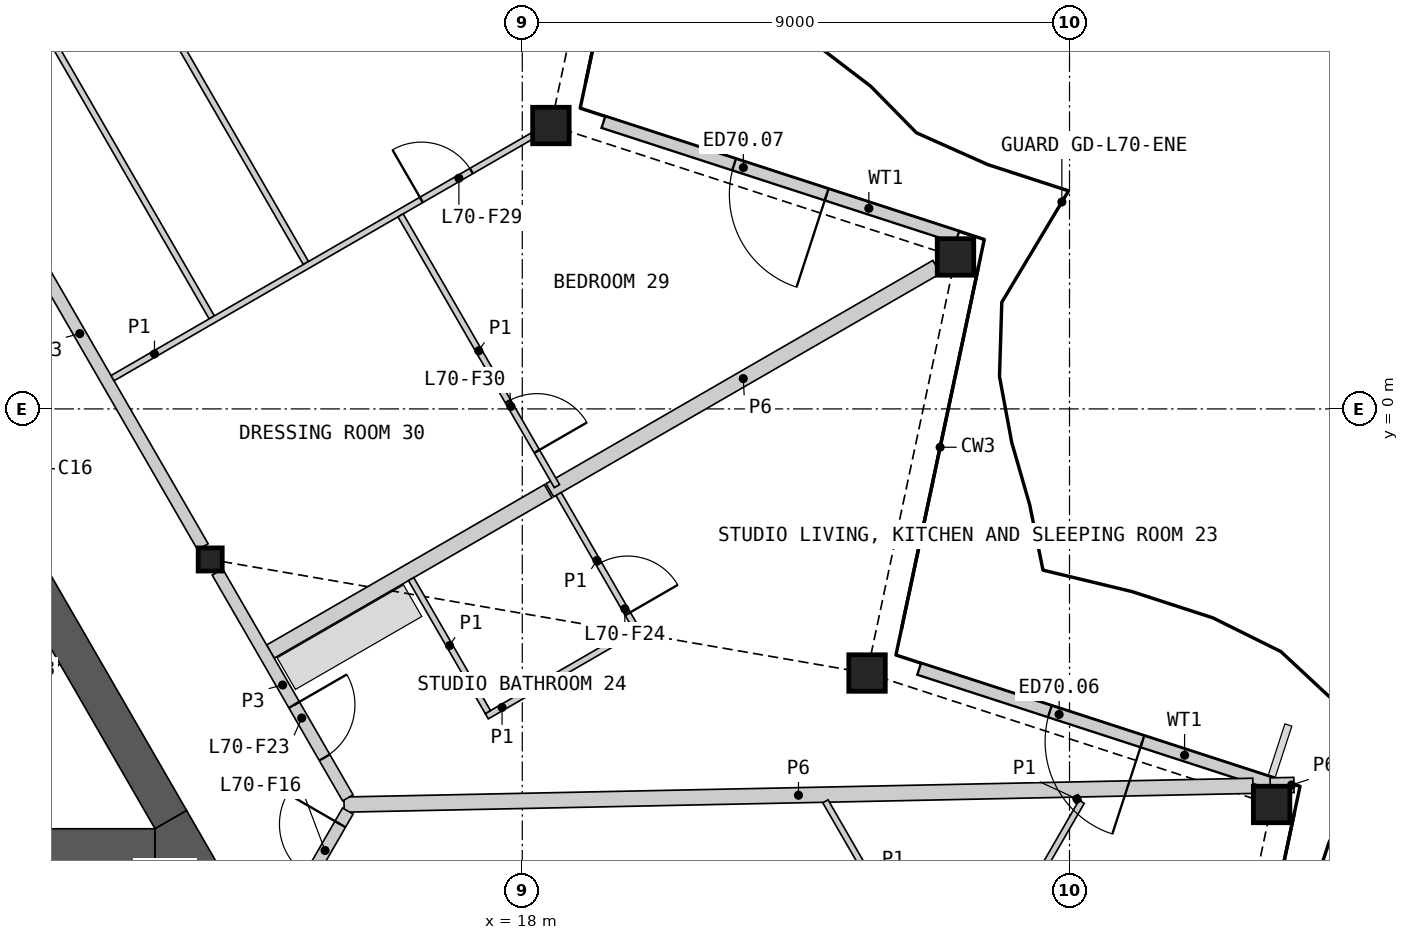
"""IFC4 building model, lengths in metres.
Left out: names, types, materials, properties, quantities, classifications, styles, units other than length and angle.
Written with IfcOpenShell. Run it as: python <this file> out.ifc"""

import sys

from ifc_helpers import new_model, si_unit, direction, frame, frame_2d, origin, origin_2d, place, context, subcontext, project, spatial, polyline, rectangle, hollow_rectangle, i_section, outline, extrude, element, fill, save


model = new_model("IFC4")
c1 = context("Model", 3, precision=1e-05, world=origin(), true_north=direction((0.0, 1.0)))
c2 = subcontext(c1, "Body", "Model", "MODEL_VIEW")
j1 = project(units=[si_unit("LENGTHUNIT", "METRE"), si_unit("PLANEANGLEUNIT", "RADIAN")], contexts=[c1])
p1 = place(None, origin())
s1 = spatial("IfcSite", under=j1, at=p1, CompositionType="ELEMENT")
p2 = place(p1, origin())
s2 = spatial("IfcBuilding", under=s1, at=p2, CompositionType="ELEMENT")
p3 = place(p2, frame((0.0, 0.0, 318.8)))
s3 = spatial("IfcBuildingStorey", under=s2, at=p3, CompositionType="ELEMENT", Elevation=318.8)
for number, where, z_axis, x_axis in (
    (1, (30.324, -6.506, 0.0), (0.0, 0.0, 1.0), (1.0, 0.0, 0.0)),
    (2, (23.67, -4.344, 0.0), (0.0, 0.0, 1.0), (1.0, 0.0, 0.0)),
    (3, (25.125, 2.499, 0.0), (0.0, 0.0, 1.0), (1.0, 0.0, 0.0)),
    (4, (18.471, 4.661, 0.0), (0.0, 0.0, 1.0), (1.0, 0.0, 0.0)),
):
    element("IfcColumn", number, at=place(p3, frame(where, z_axis=z_axis, x_axis=x_axis)), inside=s3, PredefinedType="COLUMN", context=c2, shape_type="SweptSolid", body=[
        extrude(hollow_rectangle(XDim=0.6, YDim=0.6, WallThickness=0.04, at=origin_2d()), origin(), (0.0, 0.0, 1.0), 3.4),
    ])
p4 = place(p3, frame((12.868, -2.476, 0.0), z_axis=(0.0, 0.0, 1.0), x_axis=(1.0, 0.0, 0.0)))
e5 = element("IfcColumn", 5, at=p4, inside=s3, PredefinedType="COLUMN", context=c2, shape_type="SweptSolid", body=[
    extrude(i_section(OverallWidth=0.396, OverallDepth=0.381, WebThickness=0.019, FlangeThickness=0.03, at=origin_2d()), origin(), (0.0, 0.0, 1.0), 3.4),
])
p5 = place(p3, frame((30.347, -6.168, 0.0), z_axis=(0.0, 0.0, 1.0), x_axis=(-0.951053709789, 0.309025631781, 0.0)))
e6 = element("IfcWall", 6, at=p5, inside=s3, PredefinedType="SOLIDWALL", context=c2, shape_type="SweptSolid", body=[
    extrude(rectangle(XDim=6.12, YDim=0.2, at=frame_2d((3.06, 0.0))), origin(), (0.0, 0.0, 1.0), 2.488),
])
p6 = place(p5, frame((2.26, 0.0, 0.0)))
e7 = element("IfcOpeningElement", 7, at=p6, cuts=e6, PredefinedType="OPENING", context=c2, shape_type="SweptSolid", body=[
    extrude(rectangle(XDim=1.6, YDim=2.25, at=frame_2d((0.8, 1.125))), frame((0.0, 0.11, 0.0), z_axis=(0.0, -1.0, 0.0), x_axis=(1.0, 0.0, 0.0)), (0.0, 0.0, 1.0), 0.22),
])
p7 = place(p3, frame((25.155, 2.826, 0.0), z_axis=(0.0, 0.0, 1.0), x_axis=(-0.951053709789, 0.309025631781, 0.0)))
e8 = element("IfcWall", 8, at=p7, inside=s3, PredefinedType="SOLIDWALL", context=c2, shape_type="SweptSolid", body=[
    extrude(rectangle(XDim=6.12, YDim=0.2, at=frame_2d((3.06, 0.0))), origin(), (0.0, 0.0, 1.0), 2.488),
])
p8 = place(p7, frame((2.26, 0.0, 0.0)))
e9 = element("IfcOpeningElement", 9, at=p8, cuts=e8, PredefinedType="OPENING", context=c2, shape_type="SweptSolid", body=[
    extrude(rectangle(XDim=1.6, YDim=2.25, at=frame_2d((0.8, 1.125))), frame((0.0, 0.11, 0.0), z_axis=(0.0, -1.0, 0.0), x_axis=(1.0, 0.0, 0.0)), (0.0, 0.0, 1.0), 0.22),
])
p9 = place(p3, origin())
e10 = element("IfcWall", 10, at=p9, inside=s3, PredefinedType="SHEAR", context=c2, shape_type="SweptSolid", body=[
    extrude(outline(polyline([(8.83, -6.881), (10.374, -4.206), (10.032, -4.298), (8.738, -6.539), (8.83, -6.881)])), origin(), (0.0, 0.0, 1.0), 3.1),
])
p10 = place(p3, origin())
e11 = element("IfcWall", 11, at=p10, inside=s3, PredefinedType="SHEAR", context=c2, shape_type="SweptSolid", body=[
    extrude(outline(polyline([(10.032, -4.298), (10.374, -4.206), (5.307, -1.281), (5.182, -1.498), (10.032, -4.298)])), origin(), (0.0, 0.0, 1.0), 3.1),
])
p11 = place(p3, frame((-11.961, -7.206, 0.0), z_axis=(0.0, 0.0, 1.0), x_axis=(1.0, 0.0, 0.0)))
e12 = element("IfcWall", 12, at=p11, inside=s3, PredefinedType="SHEAR", context=c2, shape_type="SweptSolid", body=[
    extrude(rectangle(XDim=23.921, YDim=0.6, at=frame_2d((11.961, 0.0))), origin(), (0.0, 0.0, 1.0), 3.1),
])
p12 = place(p3, frame((12.221, -6.756, 0.0), z_axis=(0.0, 0.0, 1.0), x_axis=(-0.50000604952, 0.866021911064, 0.0)))
e13 = element("IfcWall", 13, at=p12, inside=s3, PredefinedType="SHEAR", context=c2, shape_type="SweptSolid", body=[
    extrude(rectangle(XDim=4.869, YDim=0.6, at=frame_2d((2.434, 0.0))), origin(), (0.0, 0.0, 1.0), 3.1),
])
p13 = place(p3, origin())
e14 = element("IfcWall", 14, at=p13, inside=s3, PredefinedType="SHEAR", context=c2, shape_type="SweptSolid", body=[
    extrude(outline(polyline([(11.961, -7.506), (11.961, -6.906), (12.48, -6.606), (13.0, -7.506), (11.961, -7.506)])), origin(), (0.0, 0.0, 1.0), 3.1),
])
p14 = place(p3, frame((15.069, -6.508, 0.0), z_axis=(0.0, 0.0, 1.0), x_axis=(0.999786619639, 0.02065708573, 0.0)))
e15 = element("IfcWall", 15, at=p14, inside=s3, PredefinedType="PARTITIONING", context=c2, shape_type="SweptSolid", body=[
    extrude(rectangle(XDim=14.951, YDim=0.25, at=frame_2d((7.475, 0.0))), origin(), (0.0, 0.0, 1.0), 2.33),
])
p15 = place(p3, frame((8.698, 4.745, 0.0), z_axis=(0.0, 0.0, 1.0), x_axis=(0.499984266882, -0.866034487114, 0.0)))
e16 = element("IfcWall", 16, at=p15, inside=s3, PredefinedType="PARTITIONING", context=c2, shape_type="SweptSolid", body=[
    extrude(rectangle(XDim=8.099, YDim=0.2, at=frame_2d((4.049, 0.0))), origin(), (0.0, 0.0, 1.0), 3.1),
])
p16 = place(p3, frame((18.454, -1.338, 0.0), z_axis=(0.0, 0.0, 1.0), x_axis=(0.866023407002, 0.500003458512, 0.0)))
e17 = element("IfcWall", 17, at=p16, inside=s3, PredefinedType="PARTITIONING", context=c2, shape_type="SweptSolid", body=[
    extrude(rectangle(XDim=7.345, YDim=0.25, at=frame_2d((3.673, 0.0))), origin(), (0.0, 0.0, 1.0), 2.33),
])
p17 = place(p3, frame((13.858, -3.991, 0.0), z_axis=(0.0, 0.0, 1.0), x_axis=(0.866032983855, 0.499986870703, 0.0)))
e18 = element("IfcWall", 18, at=p17, inside=s3, PredefinedType="PARTITIONING", context=c2, shape_type="SweptSolid", body=[
    extrude(rectangle(XDim=5.275, YDim=0.25, at=frame_2d((2.638, 0.0))), origin(), (0.0, 0.0, 1.0), 2.33),
])
p18 = place(p3, frame((12.988, -2.684, 0.0), z_axis=(0.0, 0.0, 1.0), x_axis=(0.500003406062, -0.866023437285, 0.0)))
e19 = element("IfcWall", 19, at=p18, inside=s3, PredefinedType="PARTITIONING", context=c2, shape_type="SweptSolid", body=[
    extrude(rectangle(XDim=4.288, YDim=0.2, at=frame_2d((2.144, 0.0))), origin(), (0.0, 0.0, 1.0), 3.1),
])
p19 = place(p18, frame((2.521, 0.0, 0.0)))
e20 = element("IfcOpeningElement", 20, at=p19, cuts=e19, PredefinedType="OPENING", context=c2, shape_type="SweptSolid", body=[
    extrude(rectangle(XDim=1.0, YDim=2.1, at=frame_2d((0.5, 1.05))), frame((0.0, 0.11, 0.0), z_axis=(0.0, -1.0, 0.0), x_axis=(1.0, 0.0, 0.0)), (0.0, 0.0, 1.0), 0.22),
])
p20 = place(p3, frame((13.293, -9.797, 0.0), z_axis=(0.0, 0.0, 1.0), x_axis=(0.499967746641, 0.866044024469, 0.0)))
e21 = element("IfcWall", 21, at=p20, inside=s3, PredefinedType="PARTITIONING", context=c2, shape_type="SweptSolid", body=[
    extrude(rectangle(XDim=3.676, YDim=0.2, at=frame_2d((1.838, 0.0))), origin(), (0.0, 0.0, 1.0), 3.1),
])
p21 = place(p20, frame((2.426, 0.0, 0.0)))
e22 = element("IfcOpeningElement", 22, at=p21, cuts=e21, PredefinedType="OPENING", context=c2, shape_type="SweptSolid", body=[
    extrude(rectangle(XDim=1.0, YDim=2.1, at=frame_2d((0.5, 1.05))), frame((0.0, 0.11, 0.0), z_axis=(0.0, -1.0, 0.0), x_axis=(1.0, 0.0, 0.0)), (0.0, 0.0, 1.0), 0.22),
])
p22 = place(p3, frame((30.301, -6.193, 0.0), z_axis=(0.0, 0.0, 1.0), x_axis=(0.999786840126, 0.020646411592, 0.0)))
e23 = element("IfcWall", 23, at=p22, inside=s3, PredefinedType="PARTITIONING", context=c2, shape_type="SweptSolid", body=[
    extrude(rectangle(XDim=0.39, YDim=0.25, at=frame_2d((0.195, 0.0))), origin(), (0.0, 0.0, 1.0), 2.33),
])
p23 = place(p3, frame((6.74, 15.739, 0.0), z_axis=(0.0, 0.0, 1.0), x_axis=(0.499995022685, -0.86602827742, 0.0)))
e24 = element("IfcWall", 24, at=p23, inside=s3, PredefinedType="PARTITIONING", context=c2, shape_type="SweptSolid", body=[
    extrude(rectangle(XDim=15.404, YDim=0.1, at=frame_2d((7.702, 0.0))), origin(), (0.0, 0.0, 1.0), 2.33),
])
p24 = place(p23, frame((8.582, 0.0, 0.0)))
e25 = element("IfcOpeningElement", 25, at=p24, cuts=e24, PredefinedType="OPENING", context=c2, shape_type="SweptSolid", body=[
    extrude(rectangle(XDim=0.95, YDim=2.1, at=frame_2d((0.475, 1.05))), frame((0.0, 0.06, 0.0), z_axis=(0.0, -1.0, 0.0), x_axis=(1.0, 0.0, 0.0)), (0.0, 0.0, 1.0), 0.12),
])
p25 = place(p3, frame((6.504, 12.572, 0.0), z_axis=(0.0, 0.0, 1.0), x_axis=(0.499998094172, -0.866026504112, 0.0)))
e26 = element("IfcWall", 26, at=p25, inside=s3, PredefinedType="PARTITIONING", context=c2, shape_type="SweptSolid", body=[
    extrude(rectangle(XDim=12.778, YDim=0.1, at=frame_2d((6.389, 0.0))), origin(), (0.0, 0.0, 1.0), 2.33),
])
p26 = place(p25, frame((3.759, 0.0, 0.0)))
e27 = element("IfcOpeningElement", 27, at=p26, cuts=e26, PredefinedType="OPENING", context=c2, shape_type="SweptSolid", body=[
    extrude(rectangle(XDim=0.95, YDim=2.1, at=frame_2d((0.475, 1.05))), frame((0.0, 0.06, 0.0), z_axis=(0.0, -1.0, 0.0), x_axis=(1.0, 0.0, 0.0)), (0.0, 0.0, 1.0), 0.12),
])
p27 = place(p3, frame((11.261, 0.506, 0.0), z_axis=(0.0, 0.0, 1.0), x_axis=(0.866024323732, 0.500001870701, 0.0)))
e28 = element("IfcWall", 28, at=p27, inside=s3, PredefinedType="PARTITIONING", context=c2, shape_type="SweptSolid", body=[
    extrude(rectangle(XDim=7.967, YDim=0.1, at=frame_2d((3.983, 0.0))), origin(), (0.0, 0.0, 1.0), 2.33),
])
p28 = place(p27, frame((5.865, 0.0, 0.0)))
e29 = element("IfcOpeningElement", 29, at=p28, cuts=e28, PredefinedType="OPENING", context=c2, shape_type="SweptSolid", body=[
    extrude(rectangle(XDim=0.95, YDim=2.1, at=frame_2d((0.475, 1.05))), frame((0.0, 0.06, 0.0), z_axis=(0.0, -1.0, 0.0), x_axis=(1.0, 0.0, 0.0)), (0.0, 0.0, 1.0), 0.12),
])
p29 = place(p3, frame((23.223, -13.35, 0.0), z_axis=(0.0, 0.0, 1.0), x_axis=(0.500018284498, 0.866014846967, 0.0)))
e30 = element("IfcWall", 30, at=p29, inside=s3, PredefinedType="PARTITIONING", context=c2, shape_type="SweptSolid", body=[
    extrude(rectangle(XDim=7.953, YDim=0.1, at=frame_2d((3.977, 0.0))), origin(), (0.0, 0.0, 1.0), 2.33),
])
p30 = place(p29, frame((1.951, 0.0, 0.0)))
e31 = element("IfcOpeningElement", 31, at=p30, cuts=e30, PredefinedType="OPENING", context=c2, shape_type="SweptSolid", body=[
    extrude(rectangle(XDim=0.95, YDim=2.1, at=frame_2d((0.475, 1.05))), frame((0.0, 0.06, 0.0), z_axis=(0.0, -1.0, 0.0), x_axis=(1.0, 0.0, 0.0)), (0.0, 0.0, 1.0), 0.12),
])
p31 = place(p3, frame((15.999, 3.183, 0.0), z_axis=(0.0, 0.0, 1.0), x_axis=(0.500014207086, -0.866017201164, 0.0)))
e32 = element("IfcWall", 32, at=p31, inside=s3, PredefinedType="PARTITIONING", context=c2, shape_type="SweptSolid", body=[
    extrude(rectangle(XDim=5.143, YDim=0.1, at=frame_2d((2.571, 0.0))), origin(), (0.0, 0.0, 1.0), 2.33),
])
p32 = place(p31, frame((3.532, 0.0, 0.0)))
e33 = element("IfcOpeningElement", 33, at=p32, cuts=e32, PredefinedType="OPENING", context=c2, shape_type="SweptSolid", body=[
    extrude(rectangle(XDim=0.95, YDim=2.1, at=frame_2d((0.475, 1.05))), frame((0.0, 0.06, 0.0), z_axis=(0.0, -1.0, 0.0), x_axis=(1.0, 0.0, 0.0)), (0.0, 0.0, 1.0), 0.12),
])
p33 = place(p3, frame((22.986, -6.454, 0.0), z_axis=(0.0, 0.0, 1.0), x_axis=(0.499978833458, -0.866037623948, 0.0)))
e34 = element("IfcWall", 34, at=p33, inside=s3, PredefinedType="PARTITIONING", context=c2, shape_type="SweptSolid", body=[
    extrude(rectangle(XDim=3.05, YDim=0.1, at=frame_2d((1.525, 0.0))), origin(), (0.0, 0.0, 1.0), 2.33),
])
p34 = place(p3, frame((17.416, -5.055, 0.0), z_axis=(0.0, 0.0, 1.0), x_axis=(0.866032775405, 0.499987231761, 0.0)))
e35 = element("IfcWall", 35, at=p34, inside=s3, PredefinedType="PARTITIONING", context=c2, shape_type="SweptSolid", body=[
    extrude(rectangle(XDim=2.9, YDim=0.1, at=frame_2d((1.45, 0.0))), origin(), (0.0, 0.0, 1.0), 2.33),
])
p35 = place(p3, frame((16.172, -2.8, 0.0), z_axis=(0.0, 0.0, 1.0), x_axis=(0.50001820224, -0.866014894461, 0.0)))
e36 = element("IfcWall", 36, at=p35, inside=s3, PredefinedType="PARTITIONING", context=c2, shape_type="SweptSolid", body=[
    extrude(rectangle(XDim=2.525, YDim=0.1, at=frame_2d((1.262, 0.0))), origin(), (0.0, 0.0, 1.0), 2.33),
])
p36 = place(p3, frame((18.597, -1.4, 0.0), z_axis=(0.0, 0.0, 1.0), x_axis=(0.499976333282, -0.866039067339, 0.0)))
e37 = element("IfcWall", 37, at=p36, inside=s3, PredefinedType="PARTITIONING", context=c2, shape_type="SweptSolid", body=[
    extrude(rectangle(XDim=2.525, YDim=0.1, at=frame_2d((1.262, 0.0))), origin(), (0.0, 0.0, 1.0), 2.33),
])
p37 = place(p36, frame((1.325, 0.0, 0.0)))
e38 = element("IfcOpeningElement", 38, at=p37, cuts=e37, PredefinedType="OPENING", context=c2, shape_type="SweptSolid", body=[
    extrude(rectangle(XDim=0.95, YDim=2.1, at=frame_2d((0.475, 1.05))), frame((0.0, 0.06, 0.0), z_axis=(0.0, -1.0, 0.0), x_axis=(1.0, 0.0, 0.0)), (0.0, 0.0, 1.0), 0.12),
])
p38 = place(p3, frame((27.096, -6.369, 0.0), z_axis=(0.0, 0.0, 1.0), x_axis=(0.500768285049, -0.865581379588, 0.0)))
e39 = element("IfcWall", 39, at=p38, inside=s3, PredefinedType="PARTITIONING", context=c2, shape_type="SweptSolid", body=[
    extrude(rectangle(XDim=0.108, YDim=0.1, at=frame_2d((0.054, 0.0))), origin(), (0.0, 0.0, 1.0), 2.33),
])
p39 = place(p6, origin())
e40 = element("IfcDoor", 40, at=p39, inside=s3, OperationType="DOUBLE_DOOR_SINGLE_SWING", PredefinedType="DOOR", context=c2, shape_type="SweptSolid", body=[
    extrude(rectangle(XDim=1.6, YDim=2.25, at=frame_2d((0.8, 1.125))), frame((0.0, 0.025, 0.0), z_axis=(0.0, -1.0, 0.0), x_axis=(1.0, 0.0, 0.0)), (0.0, 0.0, 1.0), 0.05),
])
fill(e7, e40)
p40 = place(p8, origin())
e41 = element("IfcDoor", 41, at=p40, inside=s3, OperationType="DOUBLE_DOOR_SINGLE_SWING", PredefinedType="DOOR", context=c2, shape_type="SweptSolid", body=[
    extrude(rectangle(XDim=1.6, YDim=2.25, at=frame_2d((0.8, 1.125))), frame((0.0, 0.025, 0.0), z_axis=(0.0, -1.0, 0.0), x_axis=(1.0, 0.0, 0.0)), (0.0, 0.0, 1.0), 0.05),
])
fill(e9, e41)
p41 = place(p21, origin())
e42 = element("IfcDoor", 42, at=p41, inside=s3, OperationType="SINGLE_SWING_RIGHT", PredefinedType="DOOR", context=c2, shape_type="SweptSolid", body=[
    extrude(rectangle(XDim=1.0, YDim=2.1, at=frame_2d((0.5, 1.05))), frame((0.0, 0.025, 0.0), z_axis=(0.0, -1.0, 0.0), x_axis=(1.0, 0.0, 0.0)), (0.0, 0.0, 1.0), 0.05),
])
fill(e22, e42)
p42 = place(p19, origin())
e43 = element("IfcDoor", 43, at=p42, inside=s3, OperationType="SINGLE_SWING_LEFT", PredefinedType="DOOR", context=c2, shape_type="SweptSolid", body=[
    extrude(rectangle(XDim=1.0, YDim=2.1, at=frame_2d((0.5, 1.05))), frame((0.0, 0.025, 0.0), z_axis=(0.0, -1.0, 0.0), x_axis=(1.0, 0.0, 0.0)), (0.0, 0.0, 1.0), 0.05),
])
fill(e20, e43)
p43 = place(p37, origin())
e44 = element("IfcDoor", 44, at=p43, inside=s3, OperationType="SINGLE_SWING_RIGHT", PredefinedType="DOOR", context=c2, shape_type="SweptSolid", body=[
    extrude(rectangle(XDim=0.95, YDim=2.1, at=frame_2d((0.475, 1.05))), frame((0.0, 0.025, 0.0), z_axis=(0.0, -1.0, 0.0), x_axis=(1.0, 0.0, 0.0)), (0.0, 0.0, 1.0), 0.05),
])
fill(e38, e44)
p44 = place(p28, origin())
e45 = element("IfcDoor", 45, at=p44, inside=s3, OperationType="SINGLE_SWING_LEFT", PredefinedType="DOOR", context=c2, shape_type="SweptSolid", body=[
    extrude(rectangle(XDim=0.95, YDim=2.1, at=frame_2d((0.475, 1.05))), frame((0.0, 0.025, 0.0), z_axis=(0.0, -1.0, 0.0), x_axis=(1.0, 0.0, 0.0)), (0.0, 0.0, 1.0), 0.05),
])
fill(e29, e45)
p45 = place(p32, origin())
e46 = element("IfcDoor", 46, at=p45, inside=s3, OperationType="SINGLE_SWING_RIGHT", PredefinedType="DOOR", context=c2, shape_type="SweptSolid", body=[
    extrude(rectangle(XDim=0.95, YDim=2.1, at=frame_2d((0.475, 1.05))), frame((0.0, 0.025, 0.0), z_axis=(0.0, -1.0, 0.0), x_axis=(1.0, 0.0, 0.0)), (0.0, 0.0, 1.0), 0.05),
])
fill(e33, e46)
save(model, sys.argv[1])
